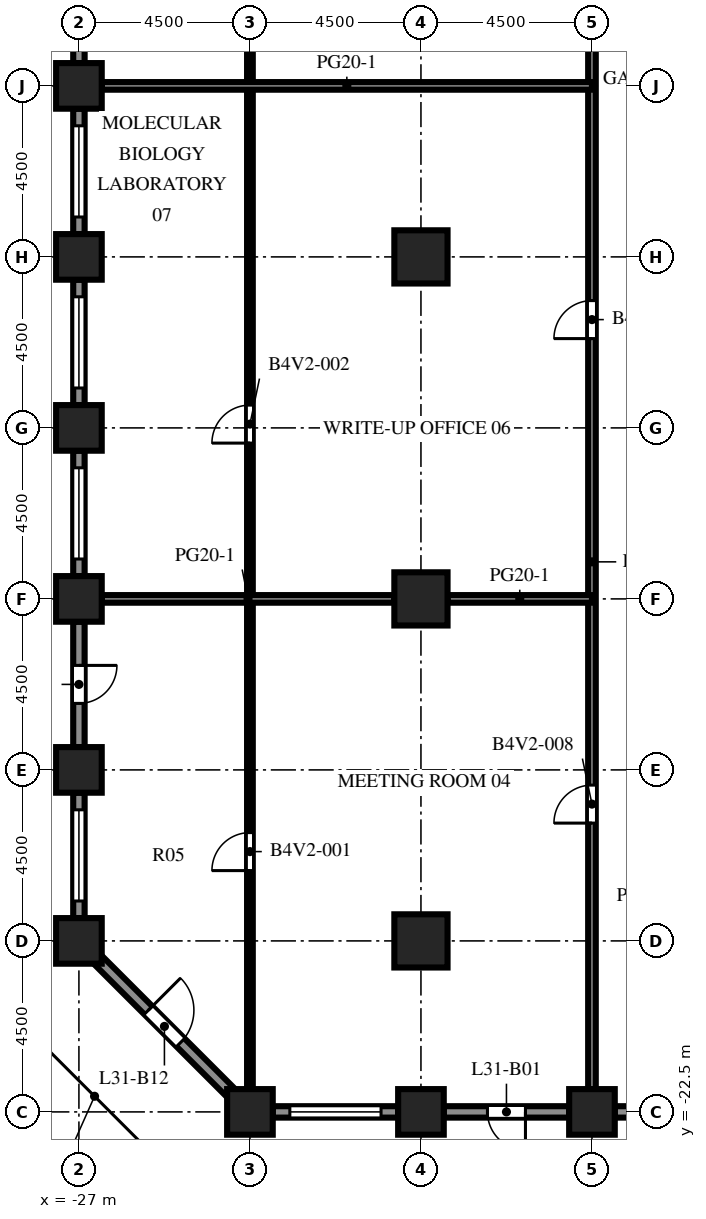
"""IFC4 building model, lengths in metres.
Left out: names, types, materials, properties, quantities, classifications, styles, units other than length and angle.
Written with IfcOpenShell. Run it as: python <this file> out.ifc"""

import sys

from ifc_helpers import new_model, si_unit, direction, frame, frame_2d, origin, origin_2d, place, context, subcontext, project, spatial, rectangle, extrude, element, fill, save


model = new_model("IFC4")
c1 = context("Model", 3, precision=1e-05, world=origin(), true_north=direction((0.0, 1.0)))
c2 = subcontext(c1, "Body", "Model", "MODEL_VIEW")
j1 = project(units=[si_unit("LENGTHUNIT", "METRE"), si_unit("PLANEANGLEUNIT", "RADIAN")], contexts=[c1])
p1 = place(None, origin())
s1 = spatial("IfcSite", under=j1, at=p1, CompositionType="ELEMENT")
p2 = place(p1, origin())
s2 = spatial("IfcBuilding", under=s1, at=p2, CompositionType="ELEMENT")
p3 = place(p2, frame((0.0, 0.0, 137.2)))
s3 = spatial("IfcBuildingStorey", under=s2, at=p3, CompositionType="ELEMENT", Elevation=137.2)
for number, where, z_axis, x_axis in (
    (1, (-27.0, -18.0, 0.0), (0.0, 0.0, 1.0), (1.0, 0.0, 0.0)),
    (2, (-27.0, -13.5, 0.0), (0.0, 0.0, 1.0), (1.0, 0.0, 0.0)),
    (3, (-27.0, -9.0, 0.0), (0.0, 0.0, 1.0), (1.0, 0.0, 0.0)),
    (4, (-27.0, -4.5, 0.0), (0.0, 0.0, 1.0), (1.0, 0.0, 0.0)),
    (5, (-27.0, 0.0, 0.0), (0.0, 0.0, 1.0), (1.0, 0.0, 0.0)),
    (6, (-27.0, 4.5, 0.0), (0.0, 0.0, 1.0), (1.0, 0.0, 0.0)),
    (7, (-22.5, -22.5, 0.0), (0.0, 0.0, 1.0), (1.0, 0.0, 0.0)),
    (8, (-18.0, -22.5, 0.0), (0.0, 0.0, 1.0), (1.0, 0.0, 0.0)),
    (9, (-13.5, -22.5, 0.0), (0.0, 0.0, 1.0), (1.0, 0.0, 0.0)),
):
    element("IfcColumn", number, at=place(p3, frame(where, z_axis=z_axis, x_axis=x_axis)), inside=s3, PredefinedType="COLUMN", context=c2, shape_type="SweptSolid", body=[
        extrude(rectangle(XDim=1.2, YDim=1.2, at=origin_2d()), origin(), (0.0, 0.0, 1.0), 4.1),
    ])
for number, where, z_axis, x_axis in (
    (10, (-18.0, -18.0, 0.0), (0.0, 0.0, 1.0), (1.0, 0.0, 0.0)),
    (11, (-18.0, -9.0, 0.0), (0.0, 0.0, 1.0), (1.0, 0.0, 0.0)),
    (12, (-18.0, 0.0, 0.0), (0.0, 0.0, 1.0), (1.0, 0.0, 0.0)),
):
    element("IfcColumn", number, at=place(p3, frame(where, z_axis=z_axis, x_axis=x_axis)), inside=s3, PredefinedType="COLUMN", context=c2, shape_type="SweptSolid", body=[
        extrude(rectangle(XDim=1.4, YDim=1.4, at=origin_2d()), origin(), (0.0, 0.0, 1.0), 4.1),
    ])
p4 = place(p3, frame((-18.6, -22.5, 0.0), z_axis=(0.0, 0.0, 1.0), x_axis=(-1.0, 0.0, 0.0)))
e13 = element("IfcWall", 13, at=p4, inside=s3, PredefinedType="SOLIDWALL", context=c2, shape_type="SweptSolid", body=[
    extrude(rectangle(XDim=3.3, YDim=0.3, at=frame_2d((1.65, 0.0))), origin(), (0.0, 0.0, 1.0), 2.75),
])
p5 = place(p4, frame((0.45, 0.0, 0.8)))
e14 = element("IfcOpeningElement", 14, at=p5, cuts=e13, PredefinedType="OPENING", context=c2, shape_type="SweptSolid", body=[
    extrude(rectangle(XDim=2.4, YDim=1.7, at=frame_2d((1.2, 0.85))), frame((0.0, 0.16, 0.0), z_axis=(0.0, -1.0, 0.0), x_axis=(1.0, 0.0, 0.0)), (0.0, 0.0, 1.0), 0.32),
])
p6 = place(p3, frame((-14.1, -22.5, 0.0), z_axis=(0.0, 0.0, 1.0), x_axis=(-1.0, 0.0, 0.0)))
e15 = element("IfcWall", 15, at=p6, inside=s3, PredefinedType="SOLIDWALL", context=c2, shape_type="SweptSolid", body=[
    extrude(rectangle(XDim=3.3, YDim=0.3, at=frame_2d((1.65, 0.0))), origin(), (0.0, 0.0, 1.0), 2.75),
])
p7 = place(p6, frame((1.15, 0.0, 0.0)))
e16 = element("IfcOpeningElement", 16, at=p7, cuts=e15, PredefinedType="OPENING", context=c2, shape_type="SweptSolid", body=[
    extrude(rectangle(XDim=1.0, YDim=2.2, at=frame_2d((0.5, 1.1))), frame((0.0, 0.16, 0.0), z_axis=(0.0, -1.0, 0.0), x_axis=(1.0, 0.0, 0.0)), (0.0, 0.0, 1.0), 0.32),
])
p8 = place(p3, frame((-9.6, -22.5, 0.0), z_axis=(0.0, 0.0, 1.0), x_axis=(-1.0, 0.0, 0.0)))
e17 = element("IfcWall", 17, at=p8, inside=s3, PredefinedType="SOLIDWALL", context=c2, shape_type="SweptSolid", body=[
    extrude(rectangle(XDim=3.3, YDim=0.3, at=frame_2d((1.65, 0.0))), origin(), (0.0, 0.0, 1.0), 2.75),
])
p9 = place(p8, frame((1.575, 0.0, 0.8)))
e18 = element("IfcOpeningElement", 18, at=p9, cuts=e17, PredefinedType="OPENING", context=c2, shape_type="SweptSolid", body=[
    extrude(rectangle(XDim=1.2, YDim=1.7, at=frame_2d((0.6, 0.85))), frame((0.0, 0.16, 0.0), z_axis=(0.0, -1.0, 0.0), x_axis=(1.0, 0.0, 0.0)), (0.0, 0.0, 1.0), 0.32),
])
p10 = place(p3, frame((-27.0, 5.1, 0.0), z_axis=(0.0, 0.0, 1.0), x_axis=(0.0, 1.0, 0.0)))
e19 = element("IfcWall", 19, at=p10, inside=s3, PredefinedType="SOLIDWALL", context=c2, shape_type="SweptSolid", body=[
    extrude(rectangle(XDim=3.3, YDim=0.3, at=frame_2d((1.65, 0.0))), origin(), (0.0, 0.0, 1.0), 2.75),
])
p11 = place(p10, frame((0.45, 0.0, 0.8)))
e20 = element("IfcOpeningElement", 20, at=p11, cuts=e19, PredefinedType="OPENING", context=c2, shape_type="SweptSolid", body=[
    extrude(rectangle(XDim=2.4, YDim=1.7, at=frame_2d((1.2, 0.85))), frame((0.0, 0.16, 0.0), z_axis=(0.0, -1.0, 0.0), x_axis=(1.0, 0.0, 0.0)), (0.0, 0.0, 1.0), 0.32),
])
p12 = place(p3, frame((-27.0, 0.6, 0.0), z_axis=(0.0, 0.0, 1.0), x_axis=(0.0, 1.0, 0.0)))
e21 = element("IfcWall", 21, at=p12, inside=s3, PredefinedType="SOLIDWALL", context=c2, shape_type="SweptSolid", body=[
    extrude(rectangle(XDim=3.3, YDim=0.3, at=frame_2d((1.65, 0.0))), origin(), (0.0, 0.0, 1.0), 2.75),
])
p13 = place(p12, frame((0.45, 0.0, 0.8)))
e22 = element("IfcOpeningElement", 22, at=p13, cuts=e21, PredefinedType="OPENING", context=c2, shape_type="SweptSolid", body=[
    extrude(rectangle(XDim=2.4, YDim=1.7, at=frame_2d((1.2, 0.85))), frame((0.0, 0.16, 0.0), z_axis=(0.0, -1.0, 0.0), x_axis=(1.0, 0.0, 0.0)), (0.0, 0.0, 1.0), 0.32),
])
p14 = place(p3, frame((-27.0, -3.9, 0.0), z_axis=(0.0, 0.0, 1.0), x_axis=(0.0, 1.0, 0.0)))
e23 = element("IfcWall", 23, at=p14, inside=s3, PredefinedType="SOLIDWALL", context=c2, shape_type="SweptSolid", body=[
    extrude(rectangle(XDim=3.3, YDim=0.3, at=frame_2d((1.65, 0.0))), origin(), (0.0, 0.0, 1.0), 2.75),
])
p15 = place(p14, frame((0.45, 0.0, 0.8)))
e24 = element("IfcOpeningElement", 24, at=p15, cuts=e23, PredefinedType="OPENING", context=c2, shape_type="SweptSolid", body=[
    extrude(rectangle(XDim=2.4, YDim=1.7, at=frame_2d((1.2, 0.85))), frame((0.0, 0.16, 0.0), z_axis=(0.0, -1.0, 0.0), x_axis=(1.0, 0.0, 0.0)), (0.0, 0.0, 1.0), 0.32),
])
p16 = place(p3, frame((-27.0, -8.4, 0.0), z_axis=(0.0, 0.0, 1.0), x_axis=(0.0, 1.0, 0.0)))
e25 = element("IfcWall", 25, at=p16, inside=s3, PredefinedType="SOLIDWALL", context=c2, shape_type="SweptSolid", body=[
    extrude(rectangle(XDim=3.3, YDim=0.3, at=frame_2d((1.65, 0.0))), origin(), (0.0, 0.0, 1.0), 2.75),
])
p17 = place(p16, frame((0.45, 0.0, 0.8)))
e26 = element("IfcOpeningElement", 26, at=p17, cuts=e25, PredefinedType="OPENING", context=c2, shape_type="SweptSolid", body=[
    extrude(rectangle(XDim=2.4, YDim=1.7, at=frame_2d((1.2, 0.85))), frame((0.0, 0.16, 0.0), z_axis=(0.0, -1.0, 0.0), x_axis=(1.0, 0.0, 0.0)), (0.0, 0.0, 1.0), 0.32),
])
p18 = place(p3, frame((-27.0, -12.9, 0.0), z_axis=(0.0, 0.0, 1.0), x_axis=(0.0, 1.0, 0.0)))
e27 = element("IfcWall", 27, at=p18, inside=s3, PredefinedType="SOLIDWALL", context=c2, shape_type="SweptSolid", body=[
    extrude(rectangle(XDim=3.3, YDim=0.3, at=frame_2d((1.65, 0.0))), origin(), (0.0, 0.0, 1.0), 2.75),
])
p19 = place(p18, frame((1.15, 0.0, 0.0)))
e28 = element("IfcOpeningElement", 28, at=p19, cuts=e27, PredefinedType="OPENING", context=c2, shape_type="SweptSolid", body=[
    extrude(rectangle(XDim=1.0, YDim=2.2, at=frame_2d((0.5, 1.1))), frame((0.0, 0.16, 0.0), z_axis=(0.0, -1.0, 0.0), x_axis=(1.0, 0.0, 0.0)), (0.0, 0.0, 1.0), 0.32),
])
p20 = place(p3, frame((-27.0, -17.4, 0.0), z_axis=(0.0, 0.0, 1.0), x_axis=(0.0, 1.0, 0.0)))
e29 = element("IfcWall", 29, at=p20, inside=s3, PredefinedType="SOLIDWALL", context=c2, shape_type="SweptSolid", body=[
    extrude(rectangle(XDim=3.3, YDim=0.3, at=frame_2d((1.65, 0.0))), origin(), (0.0, 0.0, 1.0), 2.75),
])
p21 = place(p20, frame((0.45, 0.0, 0.8)))
e30 = element("IfcOpeningElement", 30, at=p21, cuts=e29, PredefinedType="OPENING", context=c2, shape_type="SweptSolid", body=[
    extrude(rectangle(XDim=2.4, YDim=1.7, at=frame_2d((1.2, 0.85))), frame((0.0, 0.16, 0.0), z_axis=(0.0, -1.0, 0.0), x_axis=(1.0, 0.0, 0.0)), (0.0, 0.0, 1.0), 0.32),
])
p22 = place(p3, frame((-22.994, -22.006, 0.0), z_axis=(0.0, 0.0, 1.0), x_axis=(-0.707106781187, 0.707106781187, 0.0)))
e31 = element("IfcWall", 31, at=p22, inside=s3, PredefinedType="SOLIDWALL", context=c2, shape_type="SweptSolid", body=[
    extrude(rectangle(XDim=4.967, YDim=0.3, at=frame_2d((2.483, 0.0))), origin(), (0.0, 0.0, 1.0), 2.75),
])
p23 = place(p22, frame((1.884, 0.0, 0.0)))
e32 = element("IfcOpeningElement", 32, at=p23, cuts=e31, PredefinedType="OPENING", context=c2, shape_type="SweptSolid", body=[
    extrude(rectangle(XDim=1.2, YDim=2.2, at=frame_2d((0.6, 1.1))), frame((0.0, 0.16, 0.0), z_axis=(0.0, -1.0, 0.0), x_axis=(1.0, 0.0, 0.0)), (0.0, 0.0, 1.0), 0.32),
])
p24 = place(p3, frame((-22.5, -21.9, 0.0), z_axis=(0.0, 0.0, 1.0), x_axis=(0.0, 1.0, 0.0)))
e33 = element("IfcWall", 33, at=p24, inside=s3, PredefinedType="PARTITIONING", context=c2, shape_type="SweptSolid", body=[
    extrude(rectangle(XDim=52.8, YDim=0.15, at=frame_2d((26.4, 0.0))), origin(), (0.0, 0.0, 1.0), 3.65),
])
p25 = place(p24, frame((5.75, 0.0, 0.0)))
e34 = element("IfcOpeningElement", 34, at=p25, cuts=e33, PredefinedType="OPENING", context=c2, shape_type="SweptSolid", body=[
    extrude(rectangle(XDim=1.0, YDim=2.1, at=frame_2d((0.5, 1.05))), frame((0.0, 0.085, 0.0), z_axis=(0.0, -1.0, 0.0), x_axis=(1.0, 0.0, 0.0)), (0.0, 0.0, 1.0), 0.17),
])
p26 = place(p24, frame((17.0, 0.0, 0.0)))
e35 = element("IfcOpeningElement", 35, at=p26, cuts=e33, PredefinedType="OPENING", context=c2, shape_type="SweptSolid", body=[
    extrude(rectangle(XDim=1.0, YDim=2.1, at=frame_2d((0.5, 1.05))), frame((0.0, 0.085, 0.0), z_axis=(0.0, -1.0, 0.0), x_axis=(1.0, 0.0, 0.0)), (0.0, 0.0, 1.0), 0.17),
])
p27 = place(p24, frame((29.75, 0.0, 0.0)))
e36 = element("IfcOpeningElement", 36, at=p27, cuts=e33, PredefinedType="OPENING", context=c2, shape_type="SweptSolid", body=[
    extrude(rectangle(XDim=1.0, YDim=2.1, at=frame_2d((0.5, 1.05))), frame((0.0, 0.085, 0.0), z_axis=(0.0, -1.0, 0.0), x_axis=(1.0, 0.0, 0.0)), (0.0, 0.0, 1.0), 0.17),
])
p28 = place(p24, frame((43.0, 0.0, 0.0)))
e37 = element("IfcOpeningElement", 37, at=p28, cuts=e33, PredefinedType="OPENING", context=c2, shape_type="SweptSolid", body=[
    extrude(rectangle(XDim=1.0, YDim=2.1, at=frame_2d((0.5, 1.05))), frame((0.0, 0.085, 0.0), z_axis=(0.0, -1.0, 0.0), x_axis=(1.0, 0.0, 0.0)), (0.0, 0.0, 1.0), 0.17),
])
p29 = place(p24, frame((50.5, 0.0, 0.0)))
e38 = element("IfcOpeningElement", 38, at=p29, cuts=e33, PredefinedType="OPENING", context=c2, shape_type="SweptSolid", body=[
    extrude(rectangle(XDim=1.0, YDim=2.1, at=frame_2d((0.5, 1.05))), frame((0.0, 0.085, 0.0), z_axis=(0.0, -1.0, 0.0), x_axis=(1.0, 0.0, 0.0)), (0.0, 0.0, 1.0), 0.17),
])
p30 = place(p3, frame((-13.5, -21.9, 0.0), z_axis=(0.0, 0.0, 1.0), x_axis=(0.0, 1.0, 0.0)))
e39 = element("IfcWall", 39, at=p30, inside=s3, PredefinedType="PARTITIONING", context=c2, shape_type="SweptSolid", body=[
    extrude(rectangle(XDim=52.8, YDim=0.2, at=frame_2d((26.4, 0.0))), origin(), (0.0, 0.0, 1.0), 3.65),
])
p31 = place(p30, frame((7.0, 0.0, 0.0)))
e40 = element("IfcOpeningElement", 40, at=p31, cuts=e39, PredefinedType="OPENING", context=c2, shape_type="SweptSolid", body=[
    extrude(rectangle(XDim=1.0, YDim=2.1, at=frame_2d((0.5, 1.05))), frame((0.0, 0.11, 0.0), z_axis=(0.0, -1.0, 0.0), x_axis=(1.0, 0.0, 0.0)), (0.0, 0.0, 1.0), 0.22),
])
p32 = place(p30, frame((19.75, 0.0, 0.0)))
e41 = element("IfcOpeningElement", 41, at=p32, cuts=e39, PredefinedType="OPENING", context=c2, shape_type="SweptSolid", body=[
    extrude(rectangle(XDim=1.0, YDim=2.1, at=frame_2d((0.5, 1.05))), frame((0.0, 0.11, 0.0), z_axis=(0.0, -1.0, 0.0), x_axis=(1.0, 0.0, 0.0)), (0.0, 0.0, 1.0), 0.22),
])
p33 = place(p30, frame((30.5, 0.0, 0.0)))
e42 = element("IfcOpeningElement", 42, at=p33, cuts=e39, PredefinedType="OPENING", context=c2, shape_type="SweptSolid", body=[
    extrude(rectangle(XDim=1.0, YDim=2.1, at=frame_2d((0.5, 1.05))), frame((0.0, 0.11, 0.0), z_axis=(0.0, -1.0, 0.0), x_axis=(1.0, 0.0, 0.0)), (0.0, 0.0, 1.0), 0.22),
])
p34 = place(p30, frame((43.25, 0.0, 0.0)))
e43 = element("IfcOpeningElement", 43, at=p34, cuts=e39, PredefinedType="OPENING", context=c2, shape_type="SweptSolid", body=[
    extrude(rectangle(XDim=1.0, YDim=2.1, at=frame_2d((0.5, 1.05))), frame((0.0, 0.11, 0.0), z_axis=(0.0, -1.0, 0.0), x_axis=(1.0, 0.0, 0.0)), (0.0, 0.0, 1.0), 0.22),
])
p35 = place(p30, frame((50.75, 0.0, 0.0)))
e44 = element("IfcOpeningElement", 44, at=p35, cuts=e39, PredefinedType="OPENING", context=c2, shape_type="SweptSolid", body=[
    extrude(rectangle(XDim=1.0, YDim=2.1, at=frame_2d((0.5, 1.05))), frame((0.0, 0.11, 0.0), z_axis=(0.0, -1.0, 0.0), x_axis=(1.0, 0.0, 0.0)), (0.0, 0.0, 1.0), 0.22),
])
p36 = place(p3, frame((-26.4, -9.0, 0.0), z_axis=(0.0, 0.0, 1.0), x_axis=(1.0, 0.0, 0.0)))
e45 = element("IfcWall", 45, at=p36, inside=s3, PredefinedType="PARTITIONING", context=c2, shape_type="SweptSolid", body=[
    extrude(rectangle(XDim=7.7, YDim=0.2, at=frame_2d((3.85, 0.0))), origin(), (0.0, 0.0, 1.0), 3.65),
])
p37 = place(p3, frame((-17.3, -9.0, 0.0), z_axis=(0.0, 0.0, 1.0), x_axis=(1.0, 0.0, 0.0)))
e46 = element("IfcWall", 46, at=p37, inside=s3, PredefinedType="PARTITIONING", context=c2, shape_type="SweptSolid", body=[
    extrude(rectangle(XDim=3.8, YDim=0.2, at=frame_2d((1.9, 0.0))), origin(), (0.0, 0.0, 1.0), 3.65),
])
p38 = place(p3, frame((-26.4, 4.5, 0.0), z_axis=(0.0, 0.0, 1.0), x_axis=(1.0, 0.0, 0.0)))
e47 = element("IfcWall", 47, at=p38, inside=s3, PredefinedType="PARTITIONING", context=c2, shape_type="SweptSolid", body=[
    extrude(rectangle(XDim=12.9, YDim=0.2, at=frame_2d((6.45, 0.0))), origin(), (0.0, 0.0, 1.0), 3.65),
])
p39 = place(p5, origin())
e48 = element("IfcWindow", 48, at=p39, inside=s3, PartitioningType="SINGLE_PANEL", PredefinedType="WINDOW", context=c2, shape_type="SweptSolid", body=[
    extrude(rectangle(XDim=2.4, YDim=1.7, at=frame_2d((1.2, 0.85))), frame((0.0, 0.03, 0.0), z_axis=(0.0, -1.0, 0.0), x_axis=(1.0, 0.0, 0.0)), (0.0, 0.0, 1.0), 0.06),
])
fill(e14, e48)
p40 = place(p7, origin())
e49 = element("IfcDoor", 49, at=p40, inside=s3, OperationType="SINGLE_SWING_LEFT", PredefinedType="DOOR", context=c2, shape_type="SweptSolid", body=[
    extrude(rectangle(XDim=1.0, YDim=2.2, at=frame_2d((0.5, 1.1))), frame((0.0, 0.025, 0.0), z_axis=(0.0, -1.0, 0.0), x_axis=(1.0, 0.0, 0.0)), (0.0, 0.0, 1.0), 0.05),
])
fill(e16, e49)
p41 = place(p13, origin())
e50 = element("IfcWindow", 50, at=p41, inside=s3, PartitioningType="SINGLE_PANEL", PredefinedType="WINDOW", context=c2, shape_type="SweptSolid", body=[
    extrude(rectangle(XDim=2.4, YDim=1.7, at=frame_2d((1.2, 0.85))), frame((0.0, 0.03, 0.0), z_axis=(0.0, -1.0, 0.0), x_axis=(1.0, 0.0, 0.0)), (0.0, 0.0, 1.0), 0.06),
])
fill(e22, e50)
p42 = place(p15, origin())
e51 = element("IfcWindow", 51, at=p42, inside=s3, PartitioningType="SINGLE_PANEL", PredefinedType="WINDOW", context=c2, shape_type="SweptSolid", body=[
    extrude(rectangle(XDim=2.4, YDim=1.7, at=frame_2d((1.2, 0.85))), frame((0.0, 0.03, 0.0), z_axis=(0.0, -1.0, 0.0), x_axis=(1.0, 0.0, 0.0)), (0.0, 0.0, 1.0), 0.06),
])
fill(e24, e51)
p43 = place(p17, origin())
e52 = element("IfcWindow", 52, at=p43, inside=s3, PartitioningType="SINGLE_PANEL", PredefinedType="WINDOW", context=c2, shape_type="SweptSolid", body=[
    extrude(rectangle(XDim=2.4, YDim=1.7, at=frame_2d((1.2, 0.85))), frame((0.0, 0.03, 0.0), z_axis=(0.0, -1.0, 0.0), x_axis=(1.0, 0.0, 0.0)), (0.0, 0.0, 1.0), 0.06),
])
fill(e26, e52)
p44 = place(p19, origin())
e53 = element("IfcDoor", 53, at=p44, inside=s3, OperationType="SINGLE_SWING_RIGHT", PredefinedType="DOOR", context=c2, shape_type="SweptSolid", body=[
    extrude(rectangle(XDim=1.0, YDim=2.2, at=frame_2d((0.5, 1.1))), frame((0.0, 0.025, 0.0), z_axis=(0.0, -1.0, 0.0), x_axis=(1.0, 0.0, 0.0)), (0.0, 0.0, 1.0), 0.05),
])
fill(e28, e53)
p45 = place(p21, origin())
e54 = element("IfcWindow", 54, at=p45, inside=s3, PartitioningType="SINGLE_PANEL", PredefinedType="WINDOW", context=c2, shape_type="SweptSolid", body=[
    extrude(rectangle(XDim=2.4, YDim=1.7, at=frame_2d((1.2, 0.85))), frame((0.0, 0.03, 0.0), z_axis=(0.0, -1.0, 0.0), x_axis=(1.0, 0.0, 0.0)), (0.0, 0.0, 1.0), 0.06),
])
fill(e30, e54)
p46 = place(p23, origin())
e55 = element("IfcDoor", 55, at=p46, inside=s3, OperationType="SINGLE_SWING_RIGHT", PredefinedType="DOOR", context=c2, shape_type="SweptSolid", body=[
    extrude(rectangle(XDim=1.2, YDim=2.2, at=frame_2d((0.6, 1.1))), frame((0.0, 0.025, 0.0), z_axis=(0.0, -1.0, 0.0), x_axis=(1.0, 0.0, 0.0)), (0.0, 0.0, 1.0), 0.05),
])
fill(e32, e55)
p47 = place(p25, origin())
e56 = element("IfcDoor", 56, at=p47, inside=s3, OperationType="SINGLE_SWING_LEFT", PredefinedType="DOOR", context=c2, shape_type="SweptSolid", body=[
    extrude(rectangle(XDim=1.0, YDim=2.1, at=frame_2d((0.5, 1.05))), frame((0.0, 0.025, 0.0), z_axis=(0.0, -1.0, 0.0), x_axis=(1.0, 0.0, 0.0)), (0.0, 0.0, 1.0), 0.05),
])
fill(e34, e56)
p48 = place(p26, origin())
e57 = element("IfcDoor", 57, at=p48, inside=s3, OperationType="SINGLE_SWING_LEFT", PredefinedType="DOOR", context=c2, shape_type="SweptSolid", body=[
    extrude(rectangle(XDim=1.0, YDim=2.1, at=frame_2d((0.5, 1.05))), frame((0.0, 0.025, 0.0), z_axis=(0.0, -1.0, 0.0), x_axis=(1.0, 0.0, 0.0)), (0.0, 0.0, 1.0), 0.05),
])
fill(e35, e57)
p49 = place(p31, origin())
e58 = element("IfcDoor", 58, at=p49, inside=s3, OperationType="SINGLE_SWING_LEFT", PredefinedType="DOOR", context=c2, shape_type="SweptSolid", body=[
    extrude(rectangle(XDim=1.0, YDim=2.1, at=frame_2d((0.5, 1.05))), frame((0.0, 0.025, 0.0), z_axis=(0.0, -1.0, 0.0), x_axis=(1.0, 0.0, 0.0)), (0.0, 0.0, 1.0), 0.05),
])
fill(e40, e58)
p50 = place(p32, origin())
e59 = element("IfcDoor", 59, at=p50, inside=s3, OperationType="SINGLE_SWING_LEFT", PredefinedType="DOOR", context=c2, shape_type="SweptSolid", body=[
    extrude(rectangle(XDim=1.0, YDim=2.1, at=frame_2d((0.5, 1.05))), frame((0.0, 0.025, 0.0), z_axis=(0.0, -1.0, 0.0), x_axis=(1.0, 0.0, 0.0)), (0.0, 0.0, 1.0), 0.05),
])
fill(e41, e59)
save(model, sys.argv[1])
